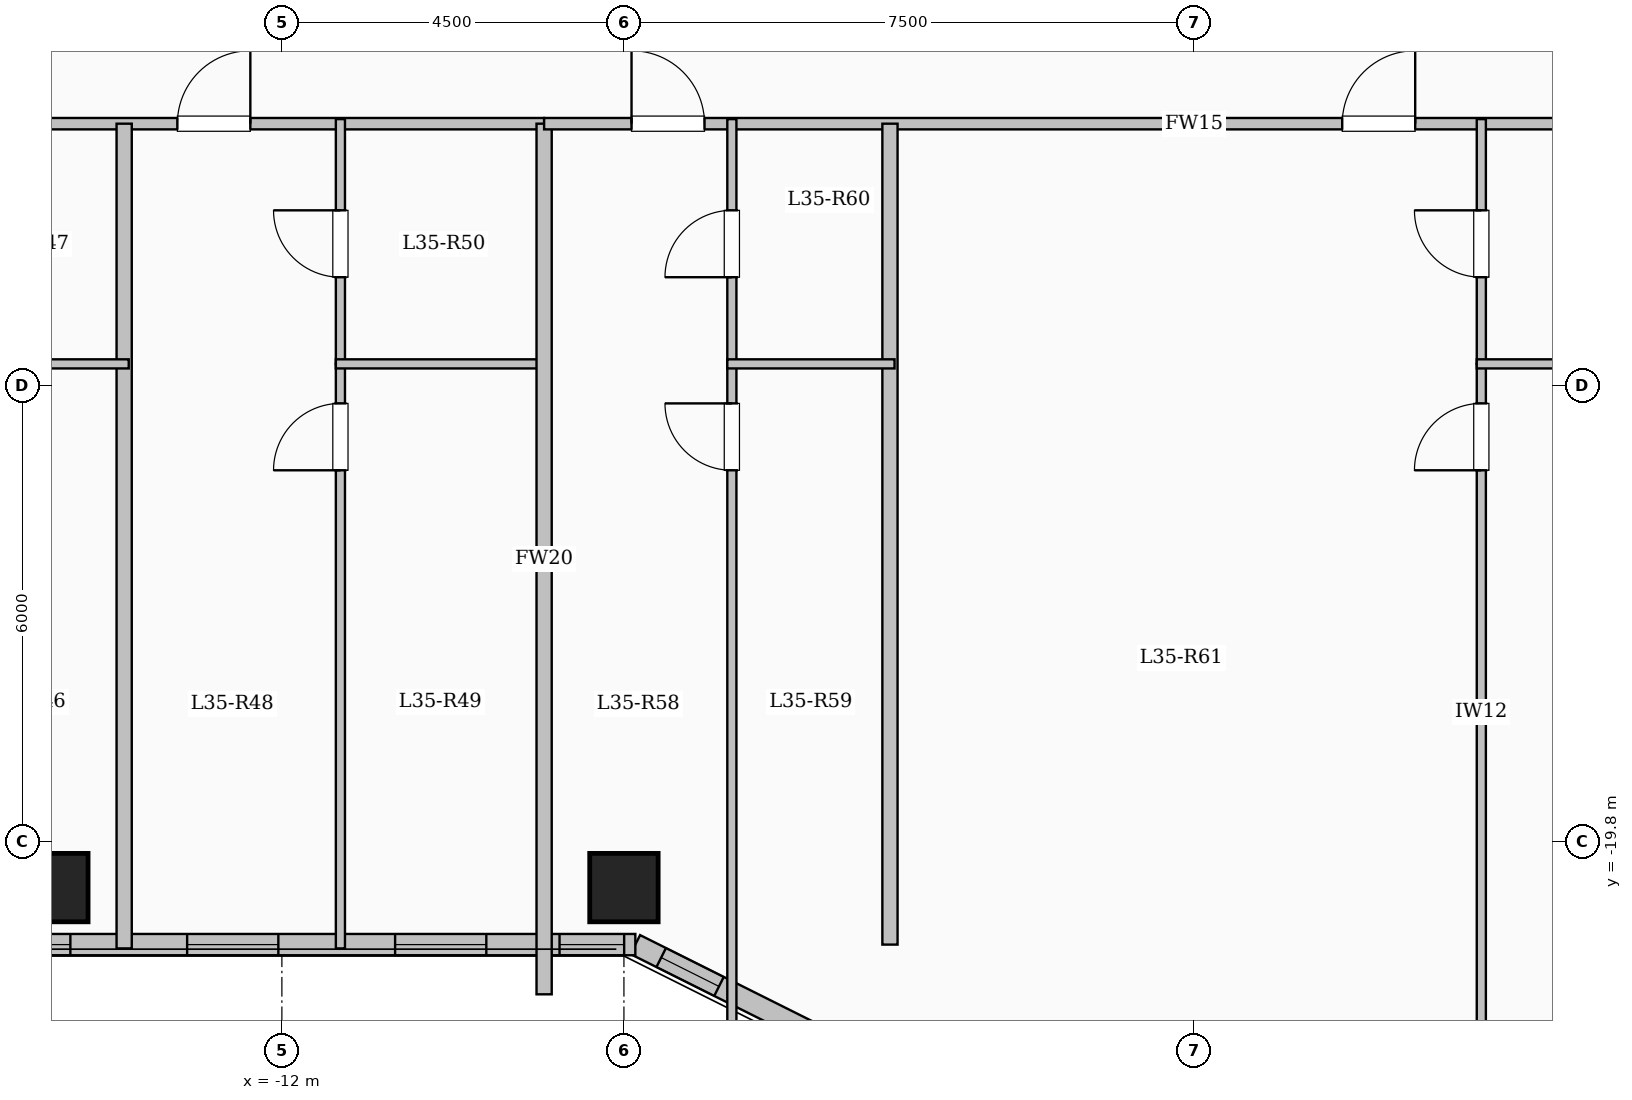
"""IFC4 building model, lengths in metres.
Left out: names, types, materials, properties, quantities, classifications, styles, units other than length and angle.
Written with IfcOpenShell. Run it as: python <this file> out.ifc"""

import sys

from ifc_helpers import new_model, si_unit, direction, frame, frame_2d, origin, origin_2d, place, context, subcontext, project, spatial, rectangle, extrude, element, fill, save


model = new_model("IFC4")
c1 = context("Model", 3, precision=1e-05, world=origin(), true_north=direction((0.0, 1.0)))
c2 = subcontext(c1, "Body", "Model", "MODEL_VIEW")
j1 = project(units=[si_unit("LENGTHUNIT", "METRE"), si_unit("PLANEANGLEUNIT", "RADIAN")], contexts=[c1])
p1 = place(None, origin())
s1 = spatial("IfcSite", under=j1, at=p1, CompositionType="ELEMENT")
p2 = place(p1, origin())
s2 = spatial("IfcBuilding", under=s1, at=p2, CompositionType="ELEMENT")
p3 = place(p2, frame((0.0, 0.0, 132.6)))
s3 = spatial("IfcBuildingStorey", under=s2, at=p3, CompositionType="ELEMENT", Elevation=132.6)
for number, where, z_axis, x_axis in (
    (1, (-15.0, -20.4, 0.0), (0.0, 0.0, 1.0), (1.0, 0.0, 0.0)),
    (2, (-7.5, -20.4, 0.0), (0.0, 0.0, 1.0), (1.0, 0.0, 0.0)),
):
    element("IfcColumn", number, at=place(p3, frame(where, z_axis=z_axis, x_axis=x_axis)), inside=s3, PredefinedType="COLUMN", context=c2, shape_type="SweptSolid", body=[
        extrude(rectangle(XDim=0.9, YDim=0.9, at=origin_2d()), origin(), (0.0, 0.0, 1.0), 3.35),
    ])
p4 = place(p3, frame((7.35, -21.15, 0.0), z_axis=(0.0, 0.0, 1.0), x_axis=(-0.894427191, -0.4472135955, 0.0)))
e3 = element("IfcWall", 3, at=p4, inside=s3, PredefinedType="SOLIDWALL", context=c2, shape_type="SweptSolid", body=[
    extrude(rectangle(XDim=3.354, YDim=0.28, at=frame_2d((1.677, 0.0))), origin(), (0.0, 0.0, 1.0), 3.1),
])
p5 = place(p4, frame((0.501, 0.0, 0.95)))
e4 = element("IfcOpeningElement", 4, at=p5, cuts=e3, PredefinedType="OPENING", context=c2, shape_type="SweptSolid", body=[
    extrude(rectangle(XDim=1.2, YDim=1.5, at=frame_2d((0.6, 0.75))), frame((0.0, 0.15, 0.0), z_axis=(0.0, -1.0, 0.0), x_axis=(1.0, 0.0, 0.0)), (0.0, 0.0, 1.0), 0.3),
])
p6 = place(p3, frame((-4.35, -22.65, 0.0), z_axis=(0.0, 0.0, 1.0), x_axis=(-0.894427191, 0.4472135955, 0.0)))
e5 = element("IfcWall", 5, at=p6, inside=s3, PredefinedType="SOLIDWALL", context=c2, shape_type="SweptSolid", body=[
    extrude(rectangle(XDim=3.354, YDim=0.28, at=frame_2d((1.677, 0.0))), origin(), (0.0, 0.0, 1.0), 3.1),
])
p7 = place(p6, frame((2.124, 0.0, 0.95)))
e6 = element("IfcOpeningElement", 6, at=p7, cuts=e5, PredefinedType="OPENING", context=c2, shape_type="SweptSolid", body=[
    extrude(rectangle(XDim=0.85, YDim=1.5, at=frame_2d((0.425, 0.75))), frame((0.0, 0.15, 0.0), z_axis=(0.0, -1.0, 0.0), x_axis=(1.0, 0.0, 0.0)), (0.0, 0.0, 1.0), 0.3),
])
p8 = place(p3, frame((-7.35, -21.15, 0.0), z_axis=(0.0, 0.0, 1.0), x_axis=(-1.0, 0.0, 0.0)))
e7 = element("IfcWall", 7, at=p8, inside=s3, PredefinedType="SOLIDWALL", context=c2, shape_type="SweptSolid", body=[
    extrude(rectangle(XDim=12.3, YDim=0.28, at=frame_2d((6.15, 0.0))), origin(), (0.0, 0.0, 1.0), 3.1),
])
p9 = place(p8, frame((0.147, 0.0, 0.95)))
e8 = element("IfcOpeningElement", 8, at=p9, cuts=e7, PredefinedType="OPENING", context=c2, shape_type="SweptSolid", body=[
    extrude(rectangle(XDim=0.85, YDim=1.5, at=frame_2d((0.425, 0.75))), frame((0.0, 0.15, 0.0), z_axis=(0.0, -1.0, 0.0), x_axis=(1.0, 0.0, 0.0)), (0.0, 0.0, 1.0), 0.3),
])
p10 = place(p8, frame((1.96, 0.0, 0.95)))
e9 = element("IfcOpeningElement", 9, at=p10, cuts=e7, PredefinedType="OPENING", context=c2, shape_type="SweptSolid", body=[
    extrude(rectangle(XDim=1.2, YDim=1.5, at=frame_2d((0.6, 0.75))), frame((0.0, 0.15, 0.0), z_axis=(0.0, -1.0, 0.0), x_axis=(1.0, 0.0, 0.0)), (0.0, 0.0, 1.0), 0.3),
])
p11 = place(p8, frame((4.697, 0.0, 0.95)))
e10 = element("IfcOpeningElement", 10, at=p11, cuts=e7, PredefinedType="OPENING", context=c2, shape_type="SweptSolid", body=[
    extrude(rectangle(XDim=1.2, YDim=1.5, at=frame_2d((0.6, 0.75))), frame((0.0, 0.15, 0.0), z_axis=(0.0, -1.0, 0.0), x_axis=(1.0, 0.0, 0.0)), (0.0, 0.0, 1.0), 0.3),
])
p12 = place(p8, frame((7.433, 0.0, 0.95)))
e11 = element("IfcOpeningElement", 11, at=p12, cuts=e7, PredefinedType="OPENING", context=c2, shape_type="SweptSolid", body=[
    extrude(rectangle(XDim=1.2, YDim=1.5, at=frame_2d((0.6, 0.75))), frame((0.0, 0.15, 0.0), z_axis=(0.0, -1.0, 0.0), x_axis=(1.0, 0.0, 0.0)), (0.0, 0.0, 1.0), 0.3),
])
p13 = place(p8, frame((10.194, 0.0, 0.95)))
e12 = element("IfcOpeningElement", 12, at=p13, cuts=e7, PredefinedType="OPENING", context=c2, shape_type="SweptSolid", body=[
    extrude(rectangle(XDim=1.2, YDim=1.5, at=frame_2d((0.6, 0.75))), frame((0.0, 0.15, 0.0), z_axis=(0.0, -1.0, 0.0), x_axis=(1.0, 0.0, 0.0)), (0.0, 0.0, 1.0), 0.3),
])
p14 = place(p3, frame((-19.55, -10.35, 0.0), z_axis=(0.0, 0.0, 1.0), x_axis=(1.0, 0.0, 0.0)))
e13 = element("IfcWall", 13, at=p14, inside=s3, PredefinedType="PARTITIONING", context=c2, shape_type="SweptSolid", body=[
    extrude(rectangle(XDim=11.0, YDim=0.15, at=frame_2d((5.5, 0.0))), origin(), (0.0, 0.0, 1.0), 3.1),
])
p15 = place(p14, frame((0.7, 0.0, 0.0)))
e14 = element("IfcOpeningElement", 14, at=p15, cuts=e13, PredefinedType="OPENING", context=c2, shape_type="SweptSolid", body=[
    extrude(rectangle(XDim=0.96, YDim=2.15, at=frame_2d((0.48, 1.075))), frame((0.0, 0.085, 0.0), z_axis=(0.0, -1.0, 0.0), x_axis=(1.0, 0.0, 0.0)), (0.0, 0.0, 1.0), 0.17),
])
p16 = place(p14, frame((6.175, 0.0, 0.0)))
e15 = element("IfcOpeningElement", 15, at=p16, cuts=e13, PredefinedType="OPENING", context=c2, shape_type="SweptSolid", body=[
    extrude(rectangle(XDim=0.96, YDim=2.15, at=frame_2d((0.48, 1.075))), frame((0.0, 0.085, 0.0), z_axis=(0.0, -1.0, 0.0), x_axis=(1.0, 0.0, 0.0)), (0.0, 0.0, 1.0), 0.17),
])
p17 = place(p3, frame((-14.075, -21.2, 0.0), z_axis=(0.0, 0.0, 1.0), x_axis=(0.0, 1.0, 0.0)))
e16 = element("IfcWall", 16, at=p17, inside=s3, PredefinedType="SOLIDWALL", context=c2, shape_type="SweptSolid", body=[
    extrude(rectangle(XDim=10.85, YDim=0.2, at=frame_2d((5.425, 0.0))), origin(), (0.0, 0.0, 1.0), 3.1),
])
p18 = place(p3, frame((-16.765, -13.51, 0.0), z_axis=(0.0, 0.0, 1.0), x_axis=(1.0, 0.0, 0.0)))
e17 = element("IfcWall", 17, at=p18, inside=s3, PredefinedType="PARTITIONING", context=c2, shape_type="SweptSolid", body=[
    extrude(rectangle(XDim=2.75, YDim=0.12, at=frame_2d((1.375, 0.0))), origin(), (0.0, 0.0, 1.0), 3.1),
])
p19 = place(p3, frame((-11.23, -21.2, 0.0), z_axis=(0.0, 0.0, 1.0), x_axis=(0.0, 1.0, 0.0)))
e18 = element("IfcWall", 18, at=p19, inside=s3, PredefinedType="PARTITIONING", context=c2, shape_type="SweptSolid", body=[
    extrude(rectangle(XDim=7.69, YDim=0.12, at=frame_2d((3.845, 0.0))), origin(), (0.0, 0.0, 1.0), 3.1),
])
p20 = place(p19, frame((6.29, 0.0, 0.0)))
e19 = element("IfcOpeningElement", 19, at=p20, cuts=e18, PredefinedType="OPENING", context=c2, shape_type="SweptSolid", body=[
    extrude(rectangle(XDim=0.88, YDim=2.1, at=frame_2d((0.44, 1.05))), frame((0.0, 0.07, 0.0), z_axis=(0.0, -1.0, 0.0), x_axis=(1.0, 0.0, 0.0)), (0.0, 0.0, 1.0), 0.14),
])
p21 = place(p3, frame((-11.23, -13.51, 0.0), z_axis=(0.0, 0.0, 1.0), x_axis=(0.0, 1.0, 0.0)))
e20 = element("IfcWall", 20, at=p21, inside=s3, PredefinedType="PARTITIONING", context=c2, shape_type="SweptSolid", body=[
    extrude(rectangle(XDim=3.22, YDim=0.12, at=frame_2d((1.61, 0.0))), origin(), (0.0, 0.0, 1.0), 3.1),
])
p22 = place(p21, frame((1.14, 0.0, 0.0)))
e21 = element("IfcOpeningElement", 21, at=p22, cuts=e20, PredefinedType="OPENING", context=c2, shape_type="SweptSolid", body=[
    extrude(rectangle(XDim=0.88, YDim=2.1, at=frame_2d((0.44, 1.05))), frame((0.0, 0.07, 0.0), z_axis=(0.0, -1.0, 0.0), x_axis=(1.0, 0.0, 0.0)), (0.0, 0.0, 1.0), 0.14),
])
p23 = place(p3, frame((-11.29, -13.51, 0.0), z_axis=(0.0, 0.0, 1.0), x_axis=(1.0, 0.0, 0.0)))
e22 = element("IfcWall", 22, at=p23, inside=s3, PredefinedType="PARTITIONING", context=c2, shape_type="SweptSolid", body=[
    extrude(rectangle(XDim=2.75, YDim=0.12, at=frame_2d((1.375, 0.0))), origin(), (0.0, 0.0, 1.0), 3.1),
])
p24 = place(p3, frame((-8.55, -21.804, 0.0), z_axis=(0.0, 0.0, 1.0), x_axis=(0.0, 1.0, 0.0)))
e23 = element("IfcWall", 23, at=p24, inside=s3, PredefinedType="SOLIDWALL", context=c2, shape_type="SweptSolid", body=[
    extrude(rectangle(XDim=11.454, YDim=0.2, at=frame_2d((5.727, 0.0))), origin(), (0.0, 0.0, 1.0), 3.1),
])
p25 = place(p3, frame((-8.55, -10.35, 0.0), z_axis=(0.0, 0.0, 1.0), x_axis=(1.0, 0.0, 0.0)))
e24 = element("IfcWall", 24, at=p25, inside=s3, PredefinedType="PARTITIONING", context=c2, shape_type="SweptSolid", body=[
    extrude(rectangle(XDim=17.1, YDim=0.15, at=frame_2d((8.55, 0.0))), origin(), (0.0, 0.0, 1.0), 3.1),
])
p26 = place(p25, frame((1.15, 0.0, 0.0)))
e25 = element("IfcOpeningElement", 25, at=p26, cuts=e24, PredefinedType="OPENING", context=c2, shape_type="SweptSolid", body=[
    extrude(rectangle(XDim=0.96, YDim=2.15, at=frame_2d((0.48, 1.075))), frame((0.0, 0.085, 0.0), z_axis=(0.0, -1.0, 0.0), x_axis=(1.0, 0.0, 0.0)), (0.0, 0.0, 1.0), 0.17),
])
p27 = place(p25, frame((10.5, 0.0, 0.0)))
e26 = element("IfcOpeningElement", 26, at=p27, cuts=e24, PredefinedType="OPENING", context=c2, shape_type="SweptSolid", body=[
    extrude(rectangle(XDim=0.96, YDim=2.15, at=frame_2d((0.48, 1.075))), frame((0.0, 0.085, 0.0), z_axis=(0.0, -1.0, 0.0), x_axis=(1.0, 0.0, 0.0)), (0.0, 0.0, 1.0), 0.17),
])
p28 = place(p3, frame((-4.0, -21.15, 0.0), z_axis=(0.0, 0.0, 1.0), x_axis=(0.0, 1.0, 0.0)))
e27 = element("IfcWall", 27, at=p28, inside=s3, PredefinedType="SOLIDWALL", context=c2, shape_type="SweptSolid", body=[
    extrude(rectangle(XDim=10.8, YDim=0.2, at=frame_2d((5.4, 0.0))), origin(), (0.0, 0.0, 1.0), 3.1),
])
p29 = place(p3, frame((-6.08, -22.414, 0.0), z_axis=(0.0, 0.0, 1.0), x_axis=(0.0, 1.0, 0.0)))
e28 = element("IfcWall", 28, at=p29, inside=s3, PredefinedType="PARTITIONING", context=c2, shape_type="SweptSolid", body=[
    extrude(rectangle(XDim=8.904, YDim=0.12, at=frame_2d((4.452, 0.0))), origin(), (0.0, 0.0, 1.0), 3.1),
])
p30 = place(p29, frame((7.504, 0.0, 0.0)))
e29 = element("IfcOpeningElement", 29, at=p30, cuts=e28, PredefinedType="OPENING", context=c2, shape_type="SweptSolid", body=[
    extrude(rectangle(XDim=0.88, YDim=2.1, at=frame_2d((0.44, 1.05))), frame((0.0, 0.07, 0.0), z_axis=(0.0, -1.0, 0.0), x_axis=(1.0, 0.0, 0.0)), (0.0, 0.0, 1.0), 0.14),
])
p31 = place(p3, frame((-6.08, -13.51, 0.0), z_axis=(0.0, 0.0, 1.0), x_axis=(0.0, 1.0, 0.0)))
e30 = element("IfcWall", 30, at=p31, inside=s3, PredefinedType="PARTITIONING", context=c2, shape_type="SweptSolid", body=[
    extrude(rectangle(XDim=3.22, YDim=0.12, at=frame_2d((1.61, 0.0))), origin(), (0.0, 0.0, 1.0), 3.1),
])
p32 = place(p31, frame((1.14, 0.0, 0.0)))
e31 = element("IfcOpeningElement", 31, at=p32, cuts=e30, PredefinedType="OPENING", context=c2, shape_type="SweptSolid", body=[
    extrude(rectangle(XDim=0.88, YDim=2.1, at=frame_2d((0.44, 1.05))), frame((0.0, 0.07, 0.0), z_axis=(0.0, -1.0, 0.0), x_axis=(1.0, 0.0, 0.0)), (0.0, 0.0, 1.0), 0.14),
])
p33 = place(p3, frame((-6.14, -13.51, 0.0), z_axis=(0.0, 0.0, 1.0), x_axis=(1.0, 0.0, 0.0)))
e32 = element("IfcWall", 32, at=p33, inside=s3, PredefinedType="PARTITIONING", context=c2, shape_type="SweptSolid", body=[
    extrude(rectangle(XDim=2.2, YDim=0.12, at=frame_2d((1.1, 0.0))), origin(), (0.0, 0.0, 1.0), 3.1),
])
p34 = place(p3, frame((3.78, -22.68, 0.0), z_axis=(0.0, 0.0, 1.0), x_axis=(0.0, 1.0, 0.0)))
e33 = element("IfcWall", 33, at=p34, inside=s3, PredefinedType="PARTITIONING", context=c2, shape_type="SweptSolid", body=[
    extrude(rectangle(XDim=9.17, YDim=0.12, at=frame_2d((4.585, 0.0))), origin(), (0.0, 0.0, 1.0), 3.1),
])
p35 = place(p34, frame((7.77, 0.0, 0.0)))
e34 = element("IfcOpeningElement", 34, at=p35, cuts=e33, PredefinedType="OPENING", context=c2, shape_type="SweptSolid", body=[
    extrude(rectangle(XDim=0.88, YDim=2.1, at=frame_2d((0.44, 1.05))), frame((0.0, 0.07, 0.0), z_axis=(0.0, -1.0, 0.0), x_axis=(1.0, 0.0, 0.0)), (0.0, 0.0, 1.0), 0.14),
])
p36 = place(p3, frame((3.78, -13.51, 0.0), z_axis=(0.0, 0.0, 1.0), x_axis=(0.0, 1.0, 0.0)))
e35 = element("IfcWall", 35, at=p36, inside=s3, PredefinedType="PARTITIONING", context=c2, shape_type="SweptSolid", body=[
    extrude(rectangle(XDim=3.22, YDim=0.12, at=frame_2d((1.61, 0.0))), origin(), (0.0, 0.0, 1.0), 3.1),
])
p37 = place(p36, frame((1.14, 0.0, 0.0)))
e36 = element("IfcOpeningElement", 36, at=p37, cuts=e35, PredefinedType="OPENING", context=c2, shape_type="SweptSolid", body=[
    extrude(rectangle(XDim=0.88, YDim=2.1, at=frame_2d((0.44, 1.05))), frame((0.0, 0.07, 0.0), z_axis=(0.0, -1.0, 0.0), x_axis=(1.0, 0.0, 0.0)), (0.0, 0.0, 1.0), 0.14),
])
p38 = place(p3, frame((3.72, -13.51, 0.0), z_axis=(0.0, 0.0, 1.0), x_axis=(1.0, 0.0, 0.0)))
e37 = element("IfcWall", 37, at=p38, inside=s3, PredefinedType="PARTITIONING", context=c2, shape_type="SweptSolid", body=[
    extrude(rectangle(XDim=4.89, YDim=0.12, at=frame_2d((2.445, 0.0))), origin(), (0.0, 0.0, 1.0), 3.1),
])
p39 = place(p7, origin())
e38 = element("IfcWindow", 38, at=p39, inside=s3, PartitioningType="SINGLE_PANEL", PredefinedType="WINDOW", context=c2, shape_type="SweptSolid", body=[
    extrude(rectangle(XDim=0.85, YDim=1.5, at=frame_2d((0.425, 0.75))), frame((0.0, 0.03, 0.0), z_axis=(0.0, -1.0, 0.0), x_axis=(1.0, 0.0, 0.0)), (0.0, 0.0, 1.0), 0.06),
])
fill(e6, e38)
p40 = place(p9, origin())
e39 = element("IfcWindow", 39, at=p40, inside=s3, PartitioningType="SINGLE_PANEL", PredefinedType="WINDOW", context=c2, shape_type="SweptSolid", body=[
    extrude(rectangle(XDim=0.85, YDim=1.5, at=frame_2d((0.425, 0.75))), frame((0.0, 0.03, 0.0), z_axis=(0.0, -1.0, 0.0), x_axis=(1.0, 0.0, 0.0)), (0.0, 0.0, 1.0), 0.06),
])
fill(e8, e39)
p41 = place(p10, origin())
e40 = element("IfcWindow", 40, at=p41, inside=s3, PartitioningType="SINGLE_PANEL", PredefinedType="WINDOW", context=c2, shape_type="SweptSolid", body=[
    extrude(rectangle(XDim=1.2, YDim=1.5, at=frame_2d((0.6, 0.75))), frame((0.0, 0.03, 0.0), z_axis=(0.0, -1.0, 0.0), x_axis=(1.0, 0.0, 0.0)), (0.0, 0.0, 1.0), 0.06),
])
fill(e9, e40)
p42 = place(p11, origin())
e41 = element("IfcWindow", 41, at=p42, inside=s3, PartitioningType="SINGLE_PANEL", PredefinedType="WINDOW", context=c2, shape_type="SweptSolid", body=[
    extrude(rectangle(XDim=1.2, YDim=1.5, at=frame_2d((0.6, 0.75))), frame((0.0, 0.03, 0.0), z_axis=(0.0, -1.0, 0.0), x_axis=(1.0, 0.0, 0.0)), (0.0, 0.0, 1.0), 0.06),
])
fill(e10, e41)
p43 = place(p12, origin())
e42 = element("IfcWindow", 42, at=p43, inside=s3, PartitioningType="SINGLE_PANEL", PredefinedType="WINDOW", context=c2, shape_type="SweptSolid", body=[
    extrude(rectangle(XDim=1.2, YDim=1.5, at=frame_2d((0.6, 0.75))), frame((0.0, 0.03, 0.0), z_axis=(0.0, -1.0, 0.0), x_axis=(1.0, 0.0, 0.0)), (0.0, 0.0, 1.0), 0.06),
])
fill(e11, e42)
p44 = place(p16, origin())
e43 = element("IfcDoor", 43, at=p44, inside=s3, OperationType="SINGLE_SWING_RIGHT", PredefinedType="DOOR", context=c2, shape_type="SweptSolid", body=[
    extrude(rectangle(XDim=0.96, YDim=2.15, at=frame_2d((0.48, 1.075))), frame((0.0, 0.025, 0.0), z_axis=(0.0, -1.0, 0.0), x_axis=(1.0, 0.0, 0.0)), (0.0, 0.0, 1.0), 0.05),
])
fill(e15, e43)
p45 = place(p20, origin())
e44 = element("IfcDoor", 44, at=p45, inside=s3, OperationType="SINGLE_SWING_LEFT", PredefinedType="DOOR", context=c2, shape_type="SweptSolid", body=[
    extrude(rectangle(XDim=0.88, YDim=2.1, at=frame_2d((0.44, 1.05))), frame((0.0, 0.025, 0.0), z_axis=(0.0, -1.0, 0.0), x_axis=(1.0, 0.0, 0.0)), (0.0, 0.0, 1.0), 0.05),
])
fill(e19, e44)
p46 = place(p22, origin())
e45 = element("IfcDoor", 45, at=p46, inside=s3, OperationType="SINGLE_SWING_RIGHT", PredefinedType="DOOR", context=c2, shape_type="SweptSolid", body=[
    extrude(rectangle(XDim=0.88, YDim=2.1, at=frame_2d((0.44, 1.05))), frame((0.0, 0.025, 0.0), z_axis=(0.0, -1.0, 0.0), x_axis=(1.0, 0.0, 0.0)), (0.0, 0.0, 1.0), 0.05),
])
fill(e21, e45)
p47 = place(p26, origin())
e46 = element("IfcDoor", 46, at=p47, inside=s3, OperationType="SINGLE_SWING_LEFT", PredefinedType="DOOR", context=c2, shape_type="SweptSolid", body=[
    extrude(rectangle(XDim=0.96, YDim=2.15, at=frame_2d((0.48, 1.075))), frame((0.0, 0.025, 0.0), z_axis=(0.0, -1.0, 0.0), x_axis=(1.0, 0.0, 0.0)), (0.0, 0.0, 1.0), 0.05),
])
fill(e25, e46)
p48 = place(p30, origin())
e47 = element("IfcDoor", 47, at=p48, inside=s3, OperationType="SINGLE_SWING_RIGHT", PredefinedType="DOOR", context=c2, shape_type="SweptSolid", body=[
    extrude(rectangle(XDim=0.88, YDim=2.1, at=frame_2d((0.44, 1.05))), frame((0.0, 0.025, 0.0), z_axis=(0.0, -1.0, 0.0), x_axis=(1.0, 0.0, 0.0)), (0.0, 0.0, 1.0), 0.05),
])
fill(e29, e47)
p49 = place(p32, origin())
e48 = element("IfcDoor", 48, at=p49, inside=s3, OperationType="SINGLE_SWING_LEFT", PredefinedType="DOOR", context=c2, shape_type="SweptSolid", body=[
    extrude(rectangle(XDim=0.88, YDim=2.1, at=frame_2d((0.44, 1.05))), frame((0.0, 0.025, 0.0), z_axis=(0.0, -1.0, 0.0), x_axis=(1.0, 0.0, 0.0)), (0.0, 0.0, 1.0), 0.05),
])
fill(e31, e48)
p50 = place(p27, origin())
e49 = element("IfcDoor", 49, at=p50, inside=s3, OperationType="SINGLE_SWING_RIGHT", PredefinedType="DOOR", context=c2, shape_type="SweptSolid", body=[
    extrude(rectangle(XDim=0.96, YDim=2.15, at=frame_2d((0.48, 1.075))), frame((0.0, 0.025, 0.0), z_axis=(0.0, -1.0, 0.0), x_axis=(1.0, 0.0, 0.0)), (0.0, 0.0, 1.0), 0.05),
])
fill(e26, e49)
p51 = place(p35, origin())
e50 = element("IfcDoor", 50, at=p51, inside=s3, OperationType="SINGLE_SWING_LEFT", PredefinedType="DOOR", context=c2, shape_type="SweptSolid", body=[
    extrude(rectangle(XDim=0.88, YDim=2.1, at=frame_2d((0.44, 1.05))), frame((0.0, 0.025, 0.0), z_axis=(0.0, -1.0, 0.0), x_axis=(1.0, 0.0, 0.0)), (0.0, 0.0, 1.0), 0.05),
])
fill(e34, e50)
p52 = place(p37, origin())
e51 = element("IfcDoor", 51, at=p52, inside=s3, OperationType="SINGLE_SWING_RIGHT", PredefinedType="DOOR", context=c2, shape_type="SweptSolid", body=[
    extrude(rectangle(XDim=0.88, YDim=2.1, at=frame_2d((0.44, 1.05))), frame((0.0, 0.025, 0.0), z_axis=(0.0, -1.0, 0.0), x_axis=(1.0, 0.0, 0.0)), (0.0, 0.0, 1.0), 0.05),
])
fill(e36, e51)
save(model, sys.argv[1])
